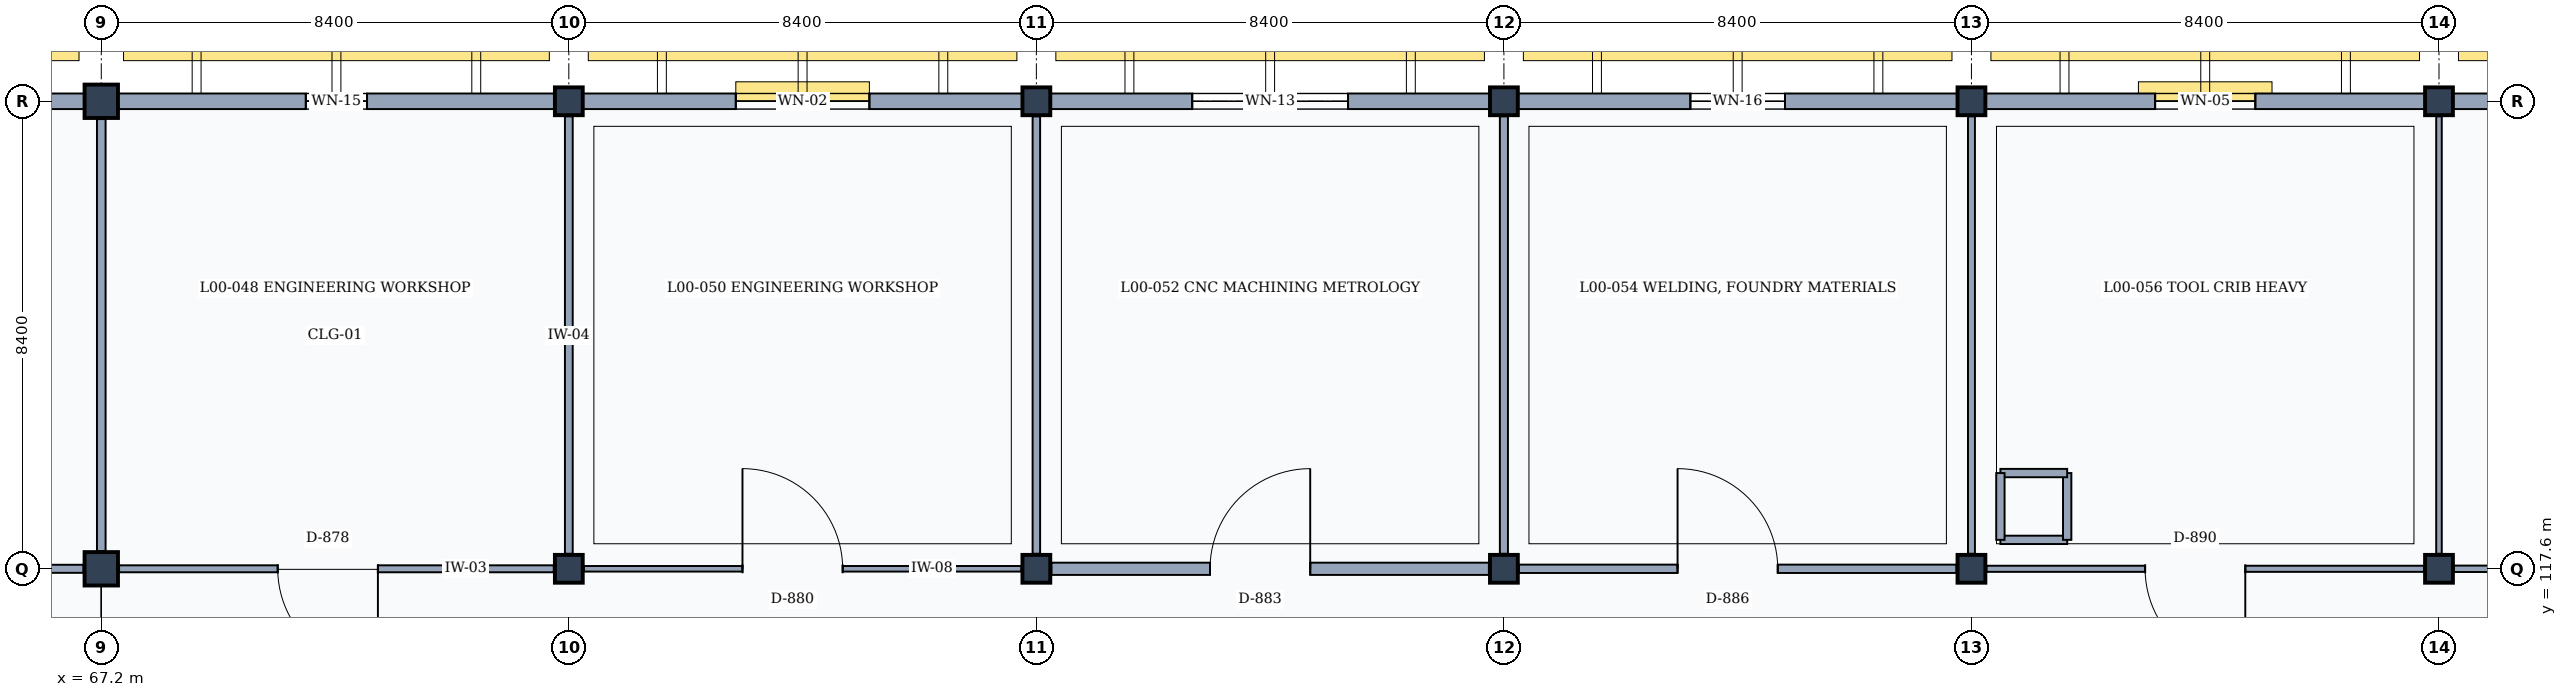
"""IFC4 building model, lengths in metres.
Left out: names, types, materials, properties, quantities, classifications, styles, units other than length and angle.
Written with IfcOpenShell. Run it as: python <this file> out.ifc"""

import sys

from ifc_helpers import new_model, si_unit, direction, frame, frame_2d, origin, origin_2d, place, context, subcontext, project, spatial, rectangle, extrude, element, fill, save


model = new_model("IFC4")
c1 = context("Model", 3, precision=1e-05, world=origin(), true_north=direction((0.0, 1.0)))
c2 = subcontext(c1, "Body", "Model", "MODEL_VIEW")
j1 = project(units=[si_unit("LENGTHUNIT", "METRE"), si_unit("PLANEANGLEUNIT", "RADIAN")], contexts=[c1])
p1 = place(None, origin())
s1 = spatial("IfcSite", under=j1, at=p1, CompositionType="ELEMENT")
p2 = place(p1, origin())
s2 = spatial("IfcBuilding", under=s1, at=p2, CompositionType="ELEMENT")
p3 = place(p2, origin())
s3 = spatial("IfcBuildingStorey", under=s2, at=p3, CompositionType="ELEMENT", Elevation=0.0)
for number, where, z_axis, x_axis in (
    (1, (67.2, 117.6, 0.0), (0.0, 0.0, 1.0), (1.0, 0.0, 0.0)),
    (2, (67.2, 126.0, 0.0), (0.0, 0.0, 1.0), (1.0, 0.0, 0.0)),
):
    element("IfcColumn", number, at=place(p3, frame(where, z_axis=z_axis, x_axis=x_axis)), inside=s3, PredefinedType="COLUMN", context=c2, shape_type="SweptSolid", body=[
        extrude(rectangle(XDim=0.6, YDim=0.6, at=origin_2d()), origin(), (0.0, 0.0, 1.0), 4.8),
    ])
for number, where, z_axis, x_axis in (
    (3, (75.6, 117.6, 0.0), (0.0, 0.0, 1.0), (1.0, 0.0, 0.0)),
    (4, (75.6, 126.0, 0.0), (0.0, 0.0, 1.0), (1.0, 0.0, 0.0)),
    (5, (84.0, 117.6, 0.0), (0.0, 0.0, 1.0), (1.0, 0.0, 0.0)),
    (6, (84.0, 126.0, 0.0), (0.0, 0.0, 1.0), (1.0, 0.0, 0.0)),
    (7, (92.4, 117.6, 0.0), (0.0, 0.0, 1.0), (1.0, 0.0, 0.0)),
    (8, (92.4, 126.0, 0.0), (0.0, 0.0, 1.0), (1.0, 0.0, 0.0)),
    (9, (100.8, 117.6, 0.0), (0.0, 0.0, 1.0), (1.0, 0.0, 0.0)),
    (10, (100.8, 126.0, 0.0), (0.0, 0.0, 1.0), (1.0, 0.0, 0.0)),
    (11, (109.2, 117.6, 0.0), (0.0, 0.0, 1.0), (1.0, 0.0, 0.0)),
    (12, (109.2, 126.0, 0.0), (0.0, 0.0, 1.0), (1.0, 0.0, 0.0)),
):
    element("IfcColumn", number, at=place(p3, frame(where, z_axis=z_axis, x_axis=x_axis)), inside=s3, PredefinedType="COLUMN", context=c2, shape_type="SweptSolid", body=[
        extrude(rectangle(XDim=0.5, YDim=0.5, at=origin_2d()), origin(), (0.0, 0.0, 1.0), 4.8),
    ])
p4 = place(p3, frame((59.1, 126.0, 0.0), z_axis=(0.0, 0.0, 1.0), x_axis=(1.0, 0.0, 0.0)))
e13 = element("IfcWall", 13, at=p4, inside=s3, PredefinedType="SOLIDWALL", context=c2, shape_type="SweptSolid", body=[
    extrude(rectangle(XDim=7.8, YDim=0.28, at=frame_2d((3.9, 0.0))), origin(), (0.0, 0.0, 1.0), 3.96),
])
p5 = place(p4, frame((3.1, 0.0, 0.95)))
e14 = element("IfcOpeningElement", 14, at=p5, cuts=e13, PredefinedType="OPENING", context=c2, shape_type="SweptSolid", body=[
    extrude(rectangle(XDim=1.6, YDim=2.0, at=frame_2d((0.8, 1.0))), frame((0.0, 0.15, 0.0), z_axis=(0.0, -1.0, 0.0), x_axis=(1.0, 0.0, 0.0)), (0.0, 0.0, 1.0), 0.3),
])
p6 = place(p3, frame((67.5, 126.0, 0.0), z_axis=(0.0, 0.0, 1.0), x_axis=(1.0, 0.0, 0.0)))
e15 = element("IfcWall", 15, at=p6, inside=s3, PredefinedType="SOLIDWALL", context=c2, shape_type="SweptSolid", body=[
    extrude(rectangle(XDim=7.85, YDim=0.28, at=frame_2d((3.925, 0.0))), origin(), (0.0, 0.0, 1.0), 3.96),
])
p7 = place(p6, frame((3.375, 0.0, 0.95)))
e16 = element("IfcOpeningElement", 16, at=p7, cuts=e15, PredefinedType="OPENING", context=c2, shape_type="SweptSolid", body=[
    extrude(rectangle(XDim=1.1, YDim=1.95, at=frame_2d((0.55, 0.975))), frame((0.0, 0.15, 0.0), z_axis=(0.0, -1.0, 0.0), x_axis=(1.0, 0.0, 0.0)), (0.0, 0.0, 1.0), 0.3),
])
p8 = place(p3, frame((75.85, 126.0, 0.0), z_axis=(0.0, 0.0, 1.0), x_axis=(1.0, 0.0, 0.0)))
e17 = element("IfcWall", 17, at=p8, inside=s3, PredefinedType="SOLIDWALL", context=c2, shape_type="SweptSolid", body=[
    extrude(rectangle(XDim=7.9, YDim=0.28, at=frame_2d((3.95, 0.0))), origin(), (0.0, 0.0, 1.0), 3.96),
])
p9 = place(p8, frame((2.75, 0.0, 0.95)))
e18 = element("IfcOpeningElement", 18, at=p9, cuts=e17, PredefinedType="OPENING", context=c2, shape_type="SweptSolid", body=[
    extrude(rectangle(XDim=2.4, YDim=1.8, at=frame_2d((1.2, 0.9))), frame((0.0, 0.15, 0.0), z_axis=(0.0, -1.0, 0.0), x_axis=(1.0, 0.0, 0.0)), (0.0, 0.0, 1.0), 0.3),
])
p10 = place(p3, frame((84.25, 126.0, 0.0), z_axis=(0.0, 0.0, 1.0), x_axis=(1.0, 0.0, 0.0)))
e19 = element("IfcWall", 19, at=p10, inside=s3, PredefinedType="SOLIDWALL", context=c2, shape_type="SweptSolid", body=[
    extrude(rectangle(XDim=7.9, YDim=0.28, at=frame_2d((3.95, 0.0))), origin(), (0.0, 0.0, 1.0), 3.96),
])
p11 = place(p10, frame((2.55, 0.0, 0.95)))
e20 = element("IfcOpeningElement", 20, at=p11, cuts=e19, PredefinedType="OPENING", context=c2, shape_type="SweptSolid", body=[
    extrude(rectangle(XDim=2.8, YDim=1.65, at=frame_2d((1.4, 0.825))), frame((0.0, 0.15, 0.0), z_axis=(0.0, -1.0, 0.0), x_axis=(1.0, 0.0, 0.0)), (0.0, 0.0, 1.0), 0.3),
])
p12 = place(p3, frame((92.65, 126.0, 0.0), z_axis=(0.0, 0.0, 1.0), x_axis=(1.0, 0.0, 0.0)))
e21 = element("IfcWall", 21, at=p12, inside=s3, PredefinedType="SOLIDWALL", context=c2, shape_type="SweptSolid", body=[
    extrude(rectangle(XDim=7.9, YDim=0.28, at=frame_2d((3.95, 0.0))), origin(), (0.0, 0.0, 1.0), 3.96),
])
p13 = place(p12, frame((3.1, 0.0, 0.95)))
e22 = element("IfcOpeningElement", 22, at=p13, cuts=e21, PredefinedType="OPENING", context=c2, shape_type="SweptSolid", body=[
    extrude(rectangle(XDim=1.7, YDim=1.55, at=frame_2d((0.85, 0.775))), frame((0.0, 0.15, 0.0), z_axis=(0.0, -1.0, 0.0), x_axis=(1.0, 0.0, 0.0)), (0.0, 0.0, 1.0), 0.3),
])
p14 = place(p3, frame((101.05, 126.0, 0.0), z_axis=(0.0, 0.0, 1.0), x_axis=(1.0, 0.0, 0.0)))
e23 = element("IfcWall", 23, at=p14, inside=s3, PredefinedType="SOLIDWALL", context=c2, shape_type="SweptSolid", body=[
    extrude(rectangle(XDim=7.9, YDim=0.28, at=frame_2d((3.95, 0.0))), origin(), (0.0, 0.0, 1.0), 3.96),
])
p15 = place(p14, frame((3.05, 0.0, 0.95)))
e24 = element("IfcOpeningElement", 24, at=p15, cuts=e23, PredefinedType="OPENING", context=c2, shape_type="SweptSolid", body=[
    extrude(rectangle(XDim=1.8, YDim=1.5, at=frame_2d((0.9, 0.75))), frame((0.0, 0.15, 0.0), z_axis=(0.0, -1.0, 0.0), x_axis=(1.0, 0.0, 0.0)), (0.0, 0.0, 1.0), 0.3),
])
p16 = place(p3, frame((109.45, 126.0, 0.0), z_axis=(0.0, 0.0, 1.0), x_axis=(1.0, 0.0, 0.0)))
e25 = element("IfcWall", 25, at=p16, inside=s3, PredefinedType="SOLIDWALL", context=c2, shape_type="SweptSolid", body=[
    extrude(rectangle(XDim=7.85, YDim=0.28, at=frame_2d((3.925, 0.0))), origin(), (0.0, 0.0, 1.0), 3.96),
])
p17 = place(p16, frame((2.425, 0.0, 0.95)))
e26 = element("IfcOpeningElement", 26, at=p17, cuts=e25, PredefinedType="OPENING", context=c2, shape_type="SweptSolid", body=[
    extrude(rectangle(XDim=3.0, YDim=1.8, at=frame_2d((1.5, 0.9))), frame((0.0, 0.15, 0.0), z_axis=(0.0, -1.0, 0.0), x_axis=(1.0, 0.0, 0.0)), (0.0, 0.0, 1.0), 0.3),
])
for number, where, z_axis, x_axis in (
    (27, (101.32, 118.12, 0.0), (0.0, 0.0, 1.0), (1.0, 0.0, 0.0)),
    (28, (102.52, 118.12, 0.0), (0.0, 0.0, 1.0), (0.0, 1.0, 0.0)),
    (29, (102.52, 119.32, 0.0), (0.0, 0.0, 1.0), (-1.0, 0.0, 0.0)),
    (30, (101.32, 119.32, 0.0), (0.0, 0.0, 1.0), (0.0, -1.0, 0.0)),
):
    element("IfcWall", number, at=place(p3, frame(where, z_axis=z_axis, x_axis=x_axis)), inside=s3, PredefinedType="PARTITIONING", context=c2, shape_type="SweptSolid", body=[
        extrude(rectangle(XDim=1.2, YDim=0.15, at=frame_2d((0.6, 0.0))), origin(), (0.0, 0.0, 1.0), 4.54),
    ])
p18 = place(p3, frame((59.12, 117.6, 0.0), z_axis=(0.0, 0.0, 1.0), x_axis=(1.0, 0.0, 0.0)))
e31 = element("IfcWall", 31, at=p18, inside=s3, PredefinedType="PARTITIONING", context=c2, shape_type="SweptSolid", body=[
    extrude(rectangle(XDim=7.76, YDim=0.145, at=frame_2d((3.88, 0.0))), origin(), (0.0, 0.0, 1.0), 3.92),
])
p19 = place(p18, frame((2.85, 0.0, 0.0)))
e32 = element("IfcOpeningElement", 32, at=p19, cuts=e31, PredefinedType="OPENING", context=c2, shape_type="SweptSolid", body=[
    extrude(rectangle(XDim=1.8, YDim=2.3, at=frame_2d((0.9, 1.15))), frame((0.0, 0.083, 0.0), z_axis=(0.0, -1.0, 0.0), x_axis=(1.0, 0.0, 0.0)), (0.0, 0.0, 1.0), 0.165),
])
p20 = place(p3, frame((67.2, 117.92, 0.0), z_axis=(0.0, 0.0, 1.0), x_axis=(0.0, 1.0, 0.0)))
e33 = element("IfcWall", 33, at=p20, inside=s3, PredefinedType="PARTITIONING", context=c2, shape_type="SweptSolid", body=[
    extrude(rectangle(XDim=7.76, YDim=0.155, at=frame_2d((3.88, 0.0))), origin(), (0.0, 0.0, 1.0), 3.92),
])
p21 = place(p3, frame((67.52, 117.6, 0.0), z_axis=(0.0, 0.0, 1.0), x_axis=(1.0, 0.0, 0.0)))
e34 = element("IfcWall", 34, at=p21, inside=s3, PredefinedType="PARTITIONING", context=c2, shape_type="SweptSolid", body=[
    extrude(rectangle(XDim=7.81, YDim=0.125, at=frame_2d((3.905, 0.0))), origin(), (0.0, 0.0, 1.0), 3.92),
])
p22 = place(p21, frame((2.85, 0.0, 0.0)))
e35 = element("IfcOpeningElement", 35, at=p22, cuts=e34, PredefinedType="OPENING", context=c2, shape_type="SweptSolid", body=[
    extrude(rectangle(XDim=1.8, YDim=2.3, at=frame_2d((0.9, 1.15))), frame((0.0, 0.073, 0.0), z_axis=(0.0, -1.0, 0.0), x_axis=(1.0, 0.0, 0.0)), (0.0, 0.0, 1.0), 0.145),
])
p23 = place(p3, frame((75.6, 117.87, 0.0), z_axis=(0.0, 0.0, 1.0), x_axis=(0.0, 1.0, 0.0)))
e36 = element("IfcWall", 36, at=p23, inside=s3, PredefinedType="PARTITIONING", context=c2, shape_type="SweptSolid", body=[
    extrude(rectangle(XDim=7.86, YDim=0.14, at=frame_2d((3.93, 0.0))), origin(), (0.0, 0.0, 1.0), 3.92),
])
p24 = place(p3, frame((75.87, 117.6, 0.0), z_axis=(0.0, 0.0, 1.0), x_axis=(1.0, 0.0, 0.0)))
e37 = element("IfcWall", 37, at=p24, inside=s3, PredefinedType="MOVABLE", context=c2, shape_type="SweptSolid", body=[
    extrude(rectangle(XDim=7.86, YDim=0.1, at=frame_2d((3.93, 0.0))), origin(), (0.0, 0.0, 1.0), 3.92),
])
p25 = place(p24, frame((2.85, 0.0, 0.0)))
e38 = element("IfcOpeningElement", 38, at=p25, cuts=e37, PredefinedType="OPENING", context=c2, shape_type="SweptSolid", body=[
    extrude(rectangle(XDim=1.8, YDim=2.3, at=frame_2d((0.9, 1.15))), frame((0.0, 0.06, 0.0), z_axis=(0.0, -1.0, 0.0), x_axis=(1.0, 0.0, 0.0)), (0.0, 0.0, 1.0), 0.12),
])
p26 = place(p3, frame((84.0, 117.87, 0.0), z_axis=(0.0, 0.0, 1.0), x_axis=(0.0, 1.0, 0.0)))
e39 = element("IfcWall", 39, at=p26, inside=s3, PredefinedType="PARTITIONING", context=c2, shape_type="SweptSolid", body=[
    extrude(rectangle(XDim=7.86, YDim=0.135, at=frame_2d((3.93, 0.0))), origin(), (0.0, 0.0, 1.0), 3.92),
])
p27 = place(p3, frame((84.27, 117.6, 0.0), z_axis=(0.0, 0.0, 1.0), x_axis=(1.0, 0.0, 0.0)))
e40 = element("IfcWall", 40, at=p27, inside=s3, PredefinedType="PARTITIONING", context=c2, shape_type="SweptSolid", body=[
    extrude(rectangle(XDim=7.86, YDim=0.22, at=frame_2d((3.93, 0.0))), origin(), (0.0, 0.0, 1.0), 3.92),
])
p28 = place(p27, frame((2.85, 0.0, 0.0)))
e41 = element("IfcOpeningElement", 41, at=p28, cuts=e40, PredefinedType="OPENING", context=c2, shape_type="SweptSolid", body=[
    extrude(rectangle(XDim=1.8, YDim=2.3, at=frame_2d((0.9, 1.15))), frame((0.0, 0.12, 0.0), z_axis=(0.0, -1.0, 0.0), x_axis=(1.0, 0.0, 0.0)), (0.0, 0.0, 1.0), 0.24),
])
p29 = place(p3, frame((92.4, 117.87, 0.0), z_axis=(0.0, 0.0, 1.0), x_axis=(0.0, 1.0, 0.0)))
e42 = element("IfcWall", 42, at=p29, inside=s3, PredefinedType="PARTITIONING", context=c2, shape_type="SweptSolid", body=[
    extrude(rectangle(XDim=7.86, YDim=0.145, at=frame_2d((3.93, 0.0))), origin(), (0.0, 0.0, 1.0), 3.92),
])
p30 = place(p3, frame((92.67, 117.6, 0.0), z_axis=(0.0, 0.0, 1.0), x_axis=(1.0, 0.0, 0.0)))
e43 = element("IfcWall", 43, at=p30, inside=s3, PredefinedType="PARTITIONING", context=c2, shape_type="SweptSolid", body=[
    extrude(rectangle(XDim=7.86, YDim=0.15, at=frame_2d((3.93, 0.0))), origin(), (0.0, 0.0, 1.0), 3.92),
])
p31 = place(p30, frame((2.85, 0.0, 0.0)))
e44 = element("IfcOpeningElement", 44, at=p31, cuts=e43, PredefinedType="OPENING", context=c2, shape_type="SweptSolid", body=[
    extrude(rectangle(XDim=1.8, YDim=2.3, at=frame_2d((0.9, 1.15))), frame((0.0, 0.085, 0.0), z_axis=(0.0, -1.0, 0.0), x_axis=(1.0, 0.0, 0.0)), (0.0, 0.0, 1.0), 0.17),
])
p32 = place(p3, frame((100.8, 117.87, 0.0), z_axis=(0.0, 0.0, 1.0), x_axis=(0.0, 1.0, 0.0)))
e45 = element("IfcWall", 45, at=p32, inside=s3, PredefinedType="PARTITIONING", context=c2, shape_type="SweptSolid", body=[
    extrude(rectangle(XDim=7.86, YDim=0.125, at=frame_2d((3.93, 0.0))), origin(), (0.0, 0.0, 1.0), 3.92),
])
p33 = place(p3, frame((101.07, 117.6, 0.0), z_axis=(0.0, 0.0, 1.0), x_axis=(1.0, 0.0, 0.0)))
e46 = element("IfcWall", 46, at=p33, inside=s3, PredefinedType="PARTITIONING", context=c2, shape_type="SweptSolid", body=[
    extrude(rectangle(XDim=7.86, YDim=0.11, at=frame_2d((3.93, 0.0))), origin(), (0.0, 0.0, 1.0), 3.92),
])
p34 = place(p33, frame((2.85, 0.0, 0.0)))
e47 = element("IfcOpeningElement", 47, at=p34, cuts=e46, PredefinedType="OPENING", context=c2, shape_type="SweptSolid", body=[
    extrude(rectangle(XDim=1.8, YDim=2.3, at=frame_2d((0.9, 1.15))), frame((0.0, 0.065, 0.0), z_axis=(0.0, -1.0, 0.0), x_axis=(1.0, 0.0, 0.0)), (0.0, 0.0, 1.0), 0.13),
])
p35 = place(p3, frame((109.2, 117.87, 0.0), z_axis=(0.0, 0.0, 1.0), x_axis=(0.0, 1.0, 0.0)))
e48 = element("IfcWall", 48, at=p35, inside=s3, PredefinedType="MOVABLE", context=c2, shape_type="SweptSolid", body=[
    extrude(rectangle(XDim=7.86, YDim=0.1, at=frame_2d((3.93, 0.0))), origin(), (0.0, 0.0, 1.0), 3.92),
])
p36 = place(p3, frame((109.47, 117.6, 0.0), z_axis=(0.0, 0.0, 1.0), x_axis=(1.0, 0.0, 0.0)))
e49 = element("IfcWall", 49, at=p36, inside=s3, PredefinedType="PARTITIONING", context=c2, shape_type="SweptSolid", body=[
    extrude(rectangle(XDim=7.81, YDim=0.115, at=frame_2d((3.905, 0.0))), origin(), (0.0, 0.0, 1.0), 3.92),
])
p37 = place(p36, frame((2.85, 0.0, 0.0)))
e50 = element("IfcOpeningElement", 50, at=p37, cuts=e49, PredefinedType="OPENING", context=c2, shape_type="SweptSolid", body=[
    extrude(rectangle(XDim=1.8, YDim=2.3, at=frame_2d((0.9, 1.15))), frame((0.0, 0.067, 0.0), z_axis=(0.0, -1.0, 0.0), x_axis=(1.0, 0.0, 0.0)), (0.0, 0.0, 1.0), 0.135),
])
p38 = place(p7, origin())
e51 = element("IfcWindow", 51, at=p38, inside=s3, PartitioningType="SINGLE_PANEL", PredefinedType="WINDOW", context=c2, shape_type="SweptSolid", body=[
    extrude(rectangle(XDim=1.1, YDim=1.95, at=frame_2d((0.55, 0.975))), frame((0.0, 0.03, 0.0), z_axis=(0.0, -1.0, 0.0), x_axis=(1.0, 0.0, 0.0)), (0.0, 0.0, 1.0), 0.06),
])
fill(e16, e51)
p39 = place(p9, origin())
e52 = element("IfcWindow", 52, at=p39, inside=s3, PartitioningType="SINGLE_PANEL", PredefinedType="WINDOW", context=c2, shape_type="SweptSolid", body=[
    extrude(rectangle(XDim=2.4, YDim=1.8, at=frame_2d((1.2, 0.9))), frame((0.0, 0.03, 0.0), z_axis=(0.0, -1.0, 0.0), x_axis=(1.0, 0.0, 0.0)), (0.0, 0.0, 1.0), 0.06),
])
fill(e18, e52)
p40 = place(p11, origin())
e53 = element("IfcWindow", 53, at=p40, inside=s3, PartitioningType="SINGLE_PANEL", PredefinedType="WINDOW", context=c2, shape_type="SweptSolid", body=[
    extrude(rectangle(XDim=2.8, YDim=1.65, at=frame_2d((1.4, 0.825))), frame((0.0, 0.03, 0.0), z_axis=(0.0, -1.0, 0.0), x_axis=(1.0, 0.0, 0.0)), (0.0, 0.0, 1.0), 0.06),
])
fill(e20, e53)
p41 = place(p13, origin())
e54 = element("IfcWindow", 54, at=p41, inside=s3, PartitioningType="SINGLE_PANEL", PredefinedType="WINDOW", context=c2, shape_type="SweptSolid", body=[
    extrude(rectangle(XDim=1.7, YDim=1.55, at=frame_2d((0.85, 0.775))), frame((0.0, 0.03, 0.0), z_axis=(0.0, -1.0, 0.0), x_axis=(1.0, 0.0, 0.0)), (0.0, 0.0, 1.0), 0.06),
])
fill(e22, e54)
p42 = place(p15, origin())
e55 = element("IfcWindow", 55, at=p42, inside=s3, PartitioningType="SINGLE_PANEL", PredefinedType="WINDOW", context=c2, shape_type="SweptSolid", body=[
    extrude(rectangle(XDim=1.8, YDim=1.5, at=frame_2d((0.9, 0.75))), frame((0.0, 0.03, 0.0), z_axis=(0.0, -1.0, 0.0), x_axis=(1.0, 0.0, 0.0)), (0.0, 0.0, 1.0), 0.06),
])
fill(e24, e55)
p43 = place(p22, frame((1.8, 0.0, 0.0), z_axis=(0.0, 0.0, 1.0), x_axis=(-1.0, 0.0, 0.0)))
e56 = element("IfcDoor", 56, at=p43, inside=s3, OperationType="SINGLE_SWING_LEFT", PredefinedType="DOOR", context=c2, shape_type="SweptSolid", body=[
    extrude(rectangle(XDim=1.8, YDim=2.3, at=frame_2d((0.9, 1.15))), frame((0.0, 0.025, 0.0), z_axis=(0.0, -1.0, 0.0), x_axis=(1.0, 0.0, 0.0)), (0.0, 0.0, 1.0), 0.05),
])
fill(e35, e56)
p44 = place(p25, origin())
e57 = element("IfcDoor", 57, at=p44, inside=s3, OperationType="SINGLE_SWING_LEFT", PredefinedType="DOOR", context=c2, shape_type="SweptSolid", body=[
    extrude(rectangle(XDim=1.8, YDim=2.3, at=frame_2d((0.9, 1.15))), frame((0.0, 0.025, 0.0), z_axis=(0.0, -1.0, 0.0), x_axis=(1.0, 0.0, 0.0)), (0.0, 0.0, 1.0), 0.05),
])
fill(e38, e57)
p45 = place(p28, origin())
e58 = element("IfcDoor", 58, at=p45, inside=s3, OperationType="SINGLE_SWING_RIGHT", PredefinedType="DOOR", context=c2, shape_type="SweptSolid", body=[
    extrude(rectangle(XDim=1.8, YDim=2.3, at=frame_2d((0.9, 1.15))), frame((0.0, 0.025, 0.0), z_axis=(0.0, -1.0, 0.0), x_axis=(1.0, 0.0, 0.0)), (0.0, 0.0, 1.0), 0.05),
])
fill(e41, e58)
p46 = place(p31, origin())
e59 = element("IfcDoor", 59, at=p46, inside=s3, OperationType="SINGLE_SWING_LEFT", PredefinedType="DOOR", context=c2, shape_type="SweptSolid", body=[
    extrude(rectangle(XDim=1.8, YDim=2.3, at=frame_2d((0.9, 1.15))), frame((0.0, 0.025, 0.0), z_axis=(0.0, -1.0, 0.0), x_axis=(1.0, 0.0, 0.0)), (0.0, 0.0, 1.0), 0.05),
])
fill(e44, e59)
p47 = place(p34, frame((1.8, 0.0, 0.0), z_axis=(0.0, 0.0, 1.0), x_axis=(-1.0, 0.0, 0.0)))
e60 = element("IfcDoor", 60, at=p47, inside=s3, OperationType="SINGLE_SWING_LEFT", PredefinedType="DOOR", context=c2, shape_type="SweptSolid", body=[
    extrude(rectangle(XDim=1.8, YDim=2.3, at=frame_2d((0.9, 1.15))), frame((0.0, 0.025, 0.0), z_axis=(0.0, -1.0, 0.0), x_axis=(1.0, 0.0, 0.0)), (0.0, 0.0, 1.0), 0.05),
])
fill(e47, e60)
save(model, sys.argv[1])
